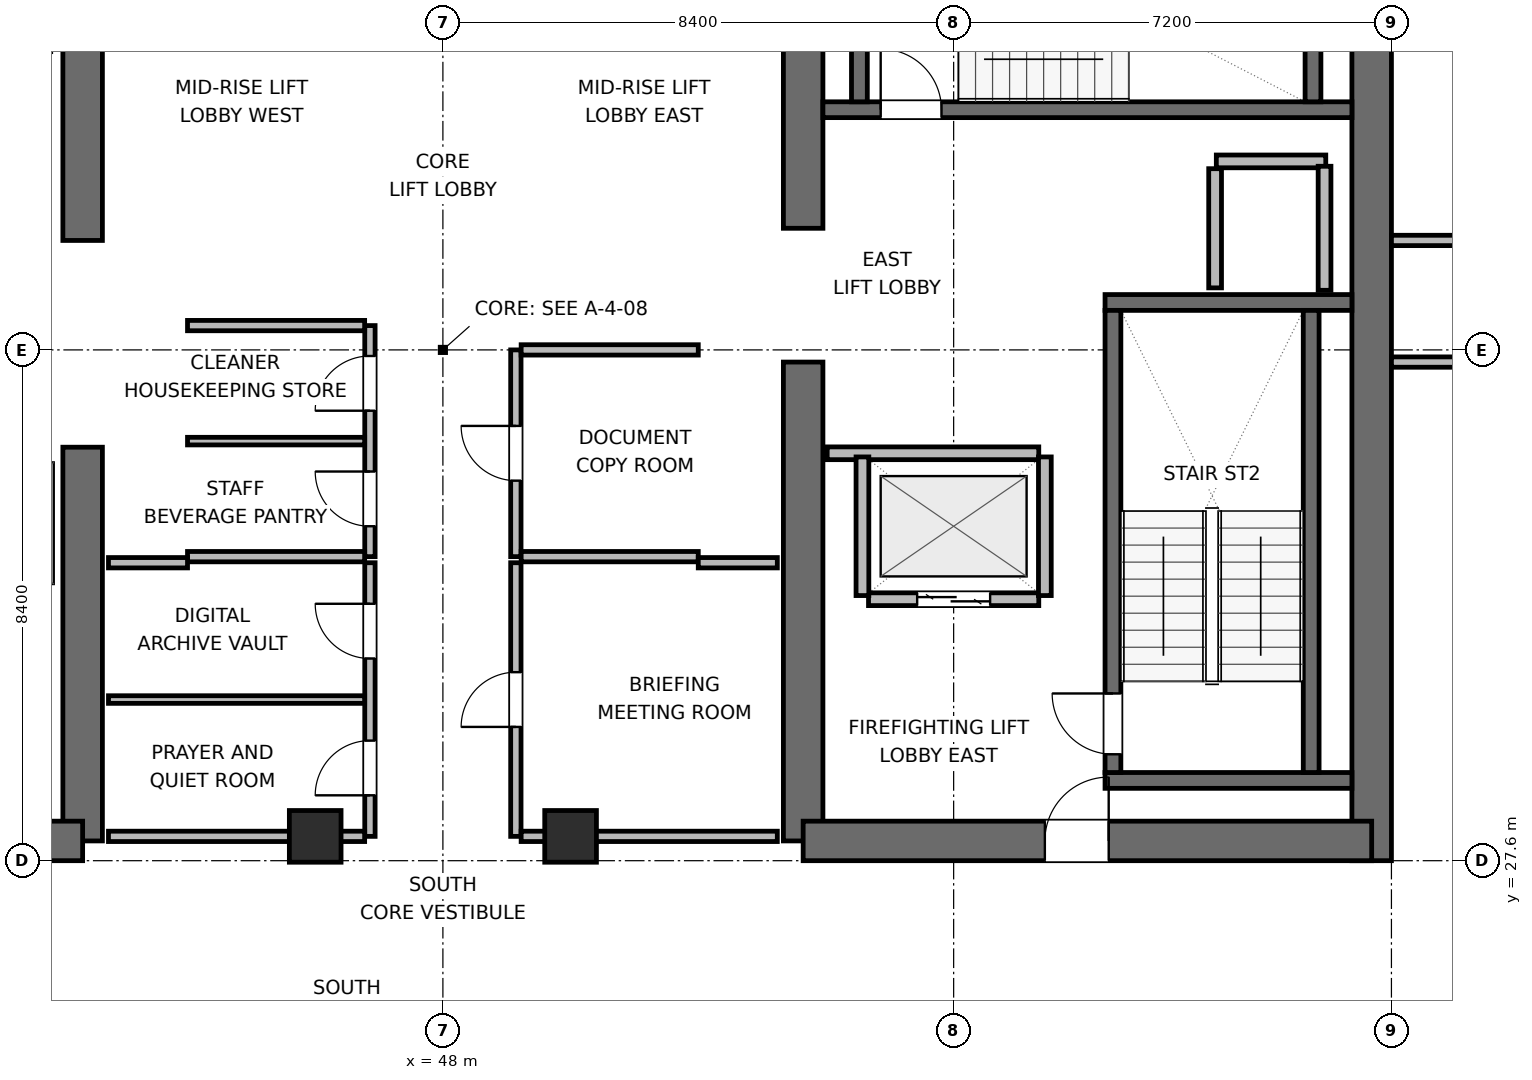
"""IFC4 building model, lengths in metres.
Left out: names, types, materials, properties, quantities, classifications, styles, units other than length and angle.
Written with IfcOpenShell. Run it as: python <this file> out.ifc"""

import sys

from ifc_helpers import new_model, si_unit, direction, frame, frame_2d, origin, origin_2d, place, context, subcontext, project, spatial, rectangle, extrude, element, fill, save


model = new_model("IFC4")
c1 = context("Model", 3, precision=1e-05, world=origin(), true_north=direction((0.0, 1.0)))
c2 = subcontext(c1, "Body", "Model", "MODEL_VIEW")
j1 = project(units=[si_unit("LENGTHUNIT", "METRE"), si_unit("PLANEANGLEUNIT", "RADIAN")], contexts=[c1])
p1 = place(None, origin())
s1 = spatial("IfcSite", under=j1, at=p1, CompositionType="ELEMENT")
p2 = place(p1, origin())
s2 = spatial("IfcBuilding", under=s1, at=p2, CompositionType="ELEMENT")
p3 = place(p2, frame((0.0, 0.0, 190.2)))
s3 = spatial("IfcBuildingStorey", under=s2, at=p3, CompositionType="ELEMENT", Elevation=190.2)
p4 = place(p3, frame((42.075, 27.925, 0.0), z_axis=(0.0, 0.0, 1.0), x_axis=(0.0, 1.0, 0.0)))
e1 = element("IfcWall", 1, at=p4, inside=s3, PredefinedType="SHEAR", context=c2, shape_type="SweptSolid", body=[
    extrude(rectangle(XDim=6.475, YDim=0.65, at=frame_2d((3.237, 0.0))), origin(), (0.0, 0.0, 1.0), 3.9),
])
p5 = place(p3, frame((42.075, 37.8, 0.0), z_axis=(0.0, 0.0, 1.0), x_axis=(0.0, 1.0, 0.0)))
e2 = element("IfcWall", 2, at=p5, inside=s3, PredefinedType="SHEAR", context=c2, shape_type="SweptSolid", body=[
    extrude(rectangle(XDim=6.275, YDim=0.65, at=frame_2d((3.137, 0.0))), origin(), (0.0, 0.0, 1.0), 3.9),
])
p6 = place(p3, frame((32.725, 27.925, 0.0), z_axis=(0.0, 0.0, 1.0), x_axis=(1.0, 0.0, 0.0)))
e3 = element("IfcWall", 3, at=p6, inside=s3, PredefinedType="SHEAR", context=c2, shape_type="SweptSolid", body=[
    extrude(rectangle(XDim=9.35, YDim=0.65, at=frame_2d((4.675, 0.0))), origin(), (0.0, 0.0, 1.0), 3.9),
])
p7 = place(p6, frame((5.025, 0.0, 0.0)))
e4 = element("IfcOpeningElement", 4, at=p7, cuts=e3, PredefinedType="OPENING", context=c2, shape_type="SweptSolid", body=[
    extrude(rectangle(XDim=1.05, YDim=2.04, at=frame_2d((0.525, 1.02))), frame((0.0, 0.335, 0.0), z_axis=(0.0, -1.0, 0.0), x_axis=(1.0, 0.0, 0.0)), (0.0, 0.0, 1.0), 0.67),
])
p8 = place(p3, frame((53.925, 27.925, 0.0), z_axis=(0.0, 0.0, 1.0), x_axis=(0.0, 1.0, 0.0)))
e5 = element("IfcWall", 5, at=p8, inside=s3, PredefinedType="SHEAR", context=c2, shape_type="SweptSolid", body=[
    extrude(rectangle(XDim=7.875, YDim=0.65, at=frame_2d((3.938, 0.0))), origin(), (0.0, 0.0, 1.0), 3.9),
])
p9 = place(p3, frame((53.925, 38.0, 0.0), z_axis=(0.0, 0.0, 1.0), x_axis=(0.0, 1.0, 0.0)))
e6 = element("IfcWall", 6, at=p9, inside=s3, PredefinedType="SHEAR", context=c2, shape_type="SweptSolid", body=[
    extrude(rectangle(XDim=6.075, YDim=0.65, at=frame_2d((3.038, 0.0))), origin(), (0.0, 0.0, 1.0), 3.9),
])
p10 = place(p3, frame((63.275, 27.6, 0.0), z_axis=(0.0, 0.0, 1.0), x_axis=(0.0, 1.0, 0.0)))
e7 = element("IfcWall", 7, at=p10, inside=s3, PredefinedType="SHEAR", context=c2, shape_type="SweptSolid", body=[
    extrude(rectangle(XDim=16.8, YDim=0.65, at=frame_2d((8.4, 0.0))), origin(), (0.0, 0.0, 1.0), 3.9),
])
p11 = place(p3, frame((53.925, 27.925, 0.0), z_axis=(0.0, 0.0, 1.0), x_axis=(1.0, 0.0, 0.0)))
e8 = element("IfcWall", 8, at=p11, inside=s3, PredefinedType="SHEAR", context=c2, shape_type="SweptSolid", body=[
    extrude(rectangle(XDim=9.35, YDim=0.65, at=frame_2d((4.675, 0.0))), origin(), (0.0, 0.0, 1.0), 3.9),
])
p12 = place(p11, frame((3.975, 0.0, 0.0)))
e9 = element("IfcOpeningElement", 9, at=p12, cuts=e8, PredefinedType="OPENING", context=c2, shape_type="SweptSolid", body=[
    extrude(rectangle(XDim=1.05, YDim=2.04, at=frame_2d((0.525, 1.02))), frame((0.0, 0.335, 0.0), z_axis=(0.0, -1.0, 0.0), x_axis=(1.0, 0.0, 0.0)), (0.0, 0.0, 1.0), 0.67),
])
for number, where, z_axis, x_axis in (
    (10, (58.89, 28.92, 0.0), (0.0, 0.0, 1.0), (1.0, 0.0, 0.0)),
    (11, (58.89, 36.78, 0.0), (0.0, 0.0, 1.0), (1.0, 0.0, 0.0)),
):
    element("IfcWall", number, at=place(p3, frame(where, z_axis=z_axis, x_axis=x_axis)), inside=s3, PredefinedType="SHEAR", context=c2, shape_type="SweptSolid", body=[
        extrude(rectangle(XDim=4.06, YDim=0.26, at=frame_2d((2.03, 0.0))), origin(), (0.0, 0.0, 1.0), 3.9),
    ])
p13 = place(p3, frame((59.02, 29.05, 0.0), z_axis=(0.0, 0.0, 1.0), x_axis=(0.0, 1.0, 0.0)))
e12 = element("IfcWall", 12, at=p13, inside=s3, PredefinedType="SHEAR", context=c2, shape_type="SweptSolid", body=[
    extrude(rectangle(XDim=7.6, YDim=0.26, at=frame_2d((3.8, 0.0))), origin(), (0.0, 0.0, 1.0), 3.9),
])
p14 = place(p13, frame((0.3, 0.0, 0.0)))
e13 = element("IfcOpeningElement", 13, at=p14, cuts=e12, PredefinedType="OPENING", context=c2, shape_type="SweptSolid", body=[
    extrude(rectangle(XDim=1.0, YDim=2.04, at=frame_2d((0.5, 1.02))), frame((0.0, 0.14, 0.0), z_axis=(0.0, -1.0, 0.0), x_axis=(1.0, 0.0, 0.0)), (0.0, 0.0, 1.0), 0.28),
])
p15 = place(p3, frame((62.28, 29.05, 0.0), z_axis=(0.0, 0.0, 1.0), x_axis=(0.0, 1.0, 0.0)))
e14 = element("IfcWall", 14, at=p15, inside=s3, PredefinedType="SHEAR", context=c2, shape_type="SweptSolid", body=[
    extrude(rectangle(XDim=7.6, YDim=0.26, at=frame_2d((3.8, 0.0))), origin(), (0.0, 0.0, 1.0), 3.9),
])
p16 = place(p3, frame((54.25, 39.95, 0.0), z_axis=(0.0, 0.0, 1.0), x_axis=(1.0, 0.0, 0.0)))
e15 = element("IfcWall", 15, at=p16, inside=s3, PredefinedType="SHEAR", context=c2, shape_type="SweptSolid", body=[
    extrude(rectangle(XDim=8.7, YDim=0.26, at=frame_2d((4.35, 0.0))), origin(), (0.0, 0.0, 1.0), 3.9),
])
p17 = place(p16, frame((0.95, 0.0, 0.0)))
e16 = element("IfcOpeningElement", 16, at=p17, cuts=e15, PredefinedType="OPENING", context=c2, shape_type="SweptSolid", body=[
    extrude(rectangle(XDim=1.0, YDim=2.04, at=frame_2d((0.5, 1.02))), frame((0.0, 0.14, 0.0), z_axis=(0.0, -1.0, 0.0), x_axis=(1.0, 0.0, 0.0)), (0.0, 0.0, 1.0), 0.28),
])
for number, where, z_axis, x_axis in (
    (17, (54.85, 40.08, 0.0), (0.0, 0.0, 1.0), (0.0, 1.0, 0.0)),
    (18, (62.31, 40.08, 0.0), (0.0, 0.0, 1.0), (0.0, 1.0, 0.0)),
):
    element("IfcWall", number, at=place(p3, frame(where, z_axis=z_axis, x_axis=x_axis)), inside=s3, PredefinedType="SHEAR", context=c2, shape_type="SweptSolid", body=[
        extrude(rectangle(XDim=2.94, YDim=0.26, at=frame_2d((1.47, 0.0))), origin(), (0.0, 0.0, 1.0), 3.9),
    ])
for number, where, z_axis, x_axis in (
    (19, (45.9, 28.0, 0.0), (0.0, 0.0, 1.0), (1.0, 0.0, 0.0)),
    (20, (50.1, 28.0, 0.0), (0.0, 0.0, 1.0), (1.0, 0.0, 0.0)),
):
    element("IfcColumn", number, at=place(p3, frame(where, z_axis=z_axis, x_axis=x_axis)), inside=s3, PredefinedType="COLUMN", context=c2, shape_type="SweptSolid", body=[
        extrude(rectangle(XDim=0.85, YDim=0.85, at=origin_2d()), origin(), (0.0, 0.0, 1.0), 3.9),
    ])
p18 = place(p3, frame((60.72, 39.1, 0.0), z_axis=(0.0, 0.0, 1.0), x_axis=(1.0, 0.0, 0.0)))
e21 = element("IfcWall", 21, at=p18, inside=s3, PredefinedType="PARTITIONING", context=c2, shape_type="SweptSolid", body=[
    extrude(rectangle(XDim=1.8, YDim=0.21, at=frame_2d((0.9, 0.0))), origin(), (0.0, 0.0, 1.0), 3.68),
])
p19 = place(p3, frame((60.7, 37.02, 0.0), z_axis=(0.0, 0.0, 1.0), x_axis=(0.0, 1.0, 0.0)))
e22 = element("IfcWall", 22, at=p19, inside=s3, PredefinedType="PARTITIONING", context=c2, shape_type="SweptSolid", body=[
    extrude(rectangle(XDim=1.96, YDim=0.21, at=frame_2d((0.98, 0.0))), origin(), (0.0, 0.0, 1.0), 3.68),
])
p20 = place(p3, frame((62.5, 36.98, 0.0), z_axis=(0.0, 0.0, 1.0), x_axis=(0.0, 1.0, 0.0)))
e23 = element("IfcWall", 23, at=p20, inside=s3, PredefinedType="PARTITIONING", context=c2, shape_type="SweptSolid", body=[
    extrude(rectangle(XDim=2.04, YDim=0.21, at=frame_2d((1.02, 0.0))), origin(), (0.0, 0.0, 1.0), 3.68),
])
p21 = place(p3, frame((55.0, 31.9, 0.0), z_axis=(0.0, 0.0, 1.0), x_axis=(1.0, 0.0, 0.0)))
e24 = element("IfcWall", 24, at=p21, inside=s3, PredefinedType="PARTITIONING", context=c2, shape_type="SweptSolid", body=[
    extrude(rectangle(XDim=2.8, YDim=0.21, at=frame_2d((1.4, 0.0))), origin(), (0.0, 0.0, 1.0), 3.68),
])
p22 = place(p21, frame((0.8, 0.0, 0.0)))
e25 = element("IfcOpeningElement", 25, at=p22, cuts=e24, PredefinedType="OPENING", context=c2, shape_type="SweptSolid", body=[
    extrude(rectangle(XDim=1.2, YDim=2.04, at=frame_2d((0.6, 1.02))), frame((0.0, 0.115, 0.0), z_axis=(0.0, -1.0, 0.0), x_axis=(1.0, 0.0, 0.0)), (0.0, 0.0, 1.0), 0.23),
])
p23 = place(p3, frame((54.32, 34.3, 0.0), z_axis=(0.0, 0.0, 1.0), x_axis=(1.0, 0.0, 0.0)))
e26 = element("IfcWall", 26, at=p23, inside=s3, PredefinedType="PARTITIONING", context=c2, shape_type="SweptSolid", body=[
    extrude(rectangle(XDim=3.48, YDim=0.21, at=frame_2d((1.74, 0.0))), origin(), (0.0, 0.0, 1.0), 3.68),
])
for number, where, z_axis, x_axis in (
    (27, (54.9, 31.96, 0.0), (0.0, 0.0, 1.0), (0.0, 1.0, 0.0)),
    (28, (57.9, 31.96, 0.0), (0.0, 0.0, 1.0), (0.0, 1.0, 0.0)),
):
    element("IfcWall", number, at=place(p3, frame(where, z_axis=z_axis, x_axis=x_axis)), inside=s3, PredefinedType="PARTITIONING", context=c2, shape_type="SweptSolid", body=[
        extrude(rectangle(XDim=2.28, YDim=0.21, at=frame_2d((1.14, 0.0))), origin(), (0.0, 0.0, 1.0), 3.68),
    ])
p24 = place(p3, frame((46.8, 32.6, 0.0), z_axis=(0.0, 0.0, 1.0), x_axis=(0.0, 1.0, 0.0)))
e29 = element("IfcWall", 29, at=p24, inside=s3, PredefinedType="PARTITIONING", context=c2, shape_type="SweptSolid", body=[
    extrude(rectangle(XDim=3.8, YDim=0.17, at=frame_2d((1.9, 0.0))), origin(), (0.0, 0.0, 1.0), 3.68),
])
p25 = place(p24, frame((0.5, 0.0, 0.0)))
e30 = element("IfcOpeningElement", 30, at=p25, cuts=e29, PredefinedType="OPENING", context=c2, shape_type="SweptSolid", body=[
    extrude(rectangle(XDim=0.9, YDim=2.02, at=frame_2d((0.45, 1.01))), frame((0.0, 0.095, 0.0), z_axis=(0.0, -1.0, 0.0), x_axis=(1.0, 0.0, 0.0)), (0.0, 0.0, 1.0), 0.19),
])
p26 = place(p24, frame((2.4, 0.0, 0.0)))
e31 = element("IfcOpeningElement", 31, at=p26, cuts=e29, PredefinedType="OPENING", context=c2, shape_type="SweptSolid", body=[
    extrude(rectangle(XDim=0.9, YDim=2.02, at=frame_2d((0.45, 1.01))), frame((0.0, 0.095, 0.0), z_axis=(0.0, -1.0, 0.0), x_axis=(1.0, 0.0, 0.0)), (0.0, 0.0, 1.0), 0.19),
])
for number, where, z_axis, x_axis in (
    (32, (43.8, 32.6, 0.0), (0.0, 0.0, 1.0), (1.0, 0.0, 0.0)),
    (33, (43.8, 36.4, 0.0), (0.0, 0.0, 1.0), (1.0, 0.0, 0.0)),
):
    element("IfcWall", number, at=place(p3, frame(where, z_axis=z_axis, x_axis=x_axis)), inside=s3, PredefinedType="PARTITIONING", context=c2, shape_type="SweptSolid", body=[
        extrude(rectangle(XDim=2.913, YDim=0.17, at=frame_2d((1.457, 0.0))), origin(), (0.0, 0.0, 1.0), 3.68),
    ])
p27 = place(p3, frame((43.8, 34.5, 0.0), z_axis=(0.0, 0.0, 1.0), x_axis=(1.0, 0.0, 0.0)))
e34 = element("IfcWall", 34, at=p27, inside=s3, PredefinedType="PARTITIONING", context=c2, shape_type="SweptSolid", body=[
    extrude(rectangle(XDim=2.913, YDim=0.125, at=frame_2d((1.457, 0.0))), origin(), (0.0, 0.0, 1.0), 3.68),
])
p28 = place(p3, frame((49.2, 32.6, 0.0), z_axis=(0.0, 0.0, 1.0), x_axis=(0.0, 1.0, 0.0)))
e35 = element("IfcWall", 35, at=p28, inside=s3, PredefinedType="PARTITIONING", context=c2, shape_type="SweptSolid", body=[
    extrude(rectangle(XDim=3.4, YDim=0.17, at=frame_2d((1.7, 0.0))), origin(), (0.0, 0.0, 1.0), 3.68),
])
p29 = place(p28, frame((1.25, 0.0, 0.0)))
e36 = element("IfcOpeningElement", 36, at=p29, cuts=e35, PredefinedType="OPENING", context=c2, shape_type="SweptSolid", body=[
    extrude(rectangle(XDim=0.9, YDim=2.02, at=frame_2d((0.45, 1.01))), frame((0.0, 0.095, 0.0), z_axis=(0.0, -1.0, 0.0), x_axis=(1.0, 0.0, 0.0)), (0.0, 0.0, 1.0), 0.19),
])
for number, where, z_axis, x_axis in (
    (37, (49.287, 32.6, 0.0), (0.0, 0.0, 1.0), (1.0, 0.0, 0.0)),
    (38, (49.287, 36.0, 0.0), (0.0, 0.0, 1.0), (1.0, 0.0, 0.0)),
):
    element("IfcWall", number, at=place(p3, frame(where, z_axis=z_axis, x_axis=x_axis)), inside=s3, PredefinedType="PARTITIONING", context=c2, shape_type="SweptSolid", body=[
        extrude(rectangle(XDim=2.913, YDim=0.17, at=frame_2d((1.457, 0.0))), origin(), (0.0, 0.0, 1.0), 3.68),
    ])
p30 = place(p3, frame((46.8, 28.0, 0.0), z_axis=(0.0, 0.0, 1.0), x_axis=(0.0, 1.0, 0.0)))
e39 = element("IfcWall", 39, at=p30, inside=s3, PredefinedType="PARTITIONING", context=c2, shape_type="SweptSolid", body=[
    extrude(rectangle(XDim=4.5, YDim=0.17, at=frame_2d((2.25, 0.0))), origin(), (0.0, 0.0, 1.0), 3.68),
])
p31 = place(p30, frame((0.675, 0.0, 0.0)))
e40 = element("IfcOpeningElement", 40, at=p31, cuts=e39, PredefinedType="OPENING", context=c2, shape_type="SweptSolid", body=[
    extrude(rectangle(XDim=0.9, YDim=2.02, at=frame_2d((0.45, 1.01))), frame((0.0, 0.095, 0.0), z_axis=(0.0, -1.0, 0.0), x_axis=(1.0, 0.0, 0.0)), (0.0, 0.0, 1.0), 0.19),
])
p32 = place(p30, frame((2.925, 0.0, 0.0)))
e41 = element("IfcOpeningElement", 41, at=p32, cuts=e39, PredefinedType="OPENING", context=c2, shape_type="SweptSolid", body=[
    extrude(rectangle(XDim=0.9, YDim=2.02, at=frame_2d((0.45, 1.01))), frame((0.0, 0.095, 0.0), z_axis=(0.0, -1.0, 0.0), x_axis=(1.0, 0.0, 0.0)), (0.0, 0.0, 1.0), 0.19),
])
p33 = place(p3, frame((42.5, 28.0, 0.0), z_axis=(0.0, 0.0, 1.0), x_axis=(1.0, 0.0, 0.0)))
e42 = element("IfcWall", 42, at=p33, inside=s3, PredefinedType="PARTITIONING", context=c2, shape_type="SweptSolid", body=[
    extrude(rectangle(XDim=4.213, YDim=0.17, at=frame_2d((2.106, 0.0))), origin(), (0.0, 0.0, 1.0), 2.765),
])
p34 = place(p3, frame((42.5, 32.5, 0.0), z_axis=(0.0, 0.0, 1.0), x_axis=(1.0, 0.0, 0.0)))
e43 = element("IfcWall", 43, at=p34, inside=s3, PredefinedType="PARTITIONING", context=c2, shape_type="SweptSolid", body=[
    extrude(rectangle(XDim=1.3, YDim=0.17, at=frame_2d((0.65, 0.0))), origin(), (0.0, 0.0, 1.0), 3.68),
])
p35 = place(p3, frame((42.5, 30.25, 0.0), z_axis=(0.0, 0.0, 1.0), x_axis=(1.0, 0.0, 0.0)))
e44 = element("IfcWall", 44, at=p35, inside=s3, PredefinedType="PARTITIONING", context=c2, shape_type="SweptSolid", body=[
    extrude(rectangle(XDim=4.213, YDim=0.125, at=frame_2d((2.106, 0.0))), origin(), (0.0, 0.0, 1.0), 3.68),
])
p36 = place(p3, frame((49.2, 28.0, 0.0), z_axis=(0.0, 0.0, 1.0), x_axis=(0.0, 1.0, 0.0)))
e45 = element("IfcWall", 45, at=p36, inside=s3, PredefinedType="PARTITIONING", context=c2, shape_type="SweptSolid", body=[
    extrude(rectangle(XDim=4.5, YDim=0.17, at=frame_2d((2.25, 0.0))), origin(), (0.0, 0.0, 1.0), 3.68),
])
p37 = place(p36, frame((1.8, 0.0, 0.0)))
e46 = element("IfcOpeningElement", 46, at=p37, cuts=e45, PredefinedType="OPENING", context=c2, shape_type="SweptSolid", body=[
    extrude(rectangle(XDim=0.9, YDim=2.02, at=frame_2d((0.45, 1.01))), frame((0.0, 0.095, 0.0), z_axis=(0.0, -1.0, 0.0), x_axis=(1.0, 0.0, 0.0)), (0.0, 0.0, 1.0), 0.19),
])
p38 = place(p3, frame((49.287, 28.0, 0.0), z_axis=(0.0, 0.0, 1.0), x_axis=(1.0, 0.0, 0.0)))
e47 = element("IfcWall", 47, at=p38, inside=s3, PredefinedType="PARTITIONING", context=c2, shape_type="SweptSolid", body=[
    extrude(rectangle(XDim=4.213, YDim=0.17, at=frame_2d((2.106, 0.0))), origin(), (0.0, 0.0, 1.0), 2.765),
])
p39 = place(p3, frame((52.2, 32.5, 0.0), z_axis=(0.0, 0.0, 1.0), x_axis=(1.0, 0.0, 0.0)))
e48 = element("IfcWall", 48, at=p39, inside=s3, PredefinedType="PARTITIONING", context=c2, shape_type="SweptSolid", body=[
    extrude(rectangle(XDim=1.3, YDim=0.17, at=frame_2d((0.65, 0.0))), origin(), (0.0, 0.0, 1.0), 3.68),
])
p40 = place(p3, frame((63.6, 35.8, 0.0), z_axis=(0.0, 0.0, 1.0), x_axis=(1.0, 0.0, 0.0)))
e49 = element("IfcWall", 49, at=p40, inside=s3, PredefinedType="PARTITIONING", context=c2, shape_type="SweptSolid", body=[
    extrude(rectangle(XDim=6.975, YDim=0.17, at=frame_2d((3.487, 0.0))), origin(), (0.0, 0.0, 1.0), 3.043),
])
p41 = place(p40, frame((1.1, 0.0, 0.0)))
e50 = element("IfcOpeningElement", 50, at=p41, cuts=e49, PredefinedType="OPENING", context=c2, shape_type="SweptSolid", body=[
    extrude(rectangle(XDim=0.95, YDim=2.04, at=frame_2d((0.475, 1.02))), frame((0.0, 0.095, 0.0), z_axis=(0.0, -1.0, 0.0), x_axis=(1.0, 0.0, 0.0)), (0.0, 0.0, 1.0), 0.19),
])
p42 = place(p3, frame((63.6, 37.8, 0.0), z_axis=(0.0, 0.0, 1.0), x_axis=(1.0, 0.0, 0.0)))
e51 = element("IfcWall", 51, at=p42, inside=s3, PredefinedType="PARTITIONING", context=c2, shape_type="SweptSolid", body=[
    extrude(rectangle(XDim=4.96, YDim=0.17, at=frame_2d((2.48, 0.0))), origin(), (0.0, 0.0, 1.0), 3.68),
])
p43 = place(p42, frame((1.1, 0.0, 0.0)))
e52 = element("IfcOpeningElement", 52, at=p43, cuts=e51, PredefinedType="OPENING", context=c2, shape_type="SweptSolid", body=[
    extrude(rectangle(XDim=0.95, YDim=2.04, at=frame_2d((0.475, 1.02))), frame((0.0, 0.095, 0.0), z_axis=(0.0, -1.0, 0.0), x_axis=(1.0, 0.0, 0.0)), (0.0, 0.0, 1.0), 0.19),
])
p44 = place(p14, origin())
e53 = element("IfcDoor", 53, at=p44, inside=s3, OperationType="SINGLE_SWING_RIGHT", PredefinedType="DOOR", context=c2, shape_type="SweptSolid", body=[
    extrude(rectangle(XDim=1.0, YDim=2.04, at=frame_2d((0.5, 1.02))), frame((0.0, 0.025, 0.0), z_axis=(0.0, -1.0, 0.0), x_axis=(1.0, 0.0, 0.0)), (0.0, 0.0, 1.0), 0.05),
])
fill(e13, e53)
p45 = place(p17, origin())
e54 = element("IfcDoor", 54, at=p45, inside=s3, OperationType="SINGLE_SWING_LEFT", PredefinedType="DOOR", context=c2, shape_type="SweptSolid", body=[
    extrude(rectangle(XDim=1.0, YDim=2.04, at=frame_2d((0.5, 1.02))), frame((0.0, 0.025, 0.0), z_axis=(0.0, -1.0, 0.0), x_axis=(1.0, 0.0, 0.0)), (0.0, 0.0, 1.0), 0.05),
])
fill(e16, e54)
p46 = place(p22, origin())
e55 = element("IfcDoor", 55, at=p46, inside=s3, OperationType="DOUBLE_DOOR_SLIDING", PredefinedType="DOOR", context=c2, shape_type="SweptSolid", body=[
    extrude(rectangle(XDim=1.2, YDim=2.04, at=frame_2d((0.6, 1.02))), frame((0.0, 0.025, 0.0), z_axis=(0.0, -1.0, 0.0), x_axis=(1.0, 0.0, 0.0)), (0.0, 0.0, 1.0), 0.05),
])
fill(e25, e55)
p47 = place(p12, origin())
e56 = element("IfcDoor", 56, at=p47, inside=s3, OperationType="SINGLE_SWING_RIGHT", PredefinedType="DOOR", context=c2, shape_type="SweptSolid", body=[
    extrude(rectangle(XDim=1.05, YDim=2.04, at=frame_2d((0.525, 1.02))), frame((0.0, 0.025, 0.0), z_axis=(0.0, -1.0, 0.0), x_axis=(1.0, 0.0, 0.0)), (0.0, 0.0, 1.0), 0.05),
])
fill(e9, e56)
p48 = place(p25, origin())
e57 = element("IfcDoor", 57, at=p48, inside=s3, OperationType="SINGLE_SWING_RIGHT", PredefinedType="DOOR", context=c2, shape_type="SweptSolid", body=[
    extrude(rectangle(XDim=0.9, YDim=2.02, at=frame_2d((0.45, 1.01))), frame((0.0, 0.025, 0.0), z_axis=(0.0, -1.0, 0.0), x_axis=(1.0, 0.0, 0.0)), (0.0, 0.0, 1.0), 0.05),
])
fill(e30, e57)
p49 = place(p26, origin())
e58 = element("IfcDoor", 58, at=p49, inside=s3, OperationType="SINGLE_SWING_LEFT", PredefinedType="DOOR", context=c2, shape_type="SweptSolid", body=[
    extrude(rectangle(XDim=0.9, YDim=2.02, at=frame_2d((0.45, 1.01))), frame((0.0, 0.025, 0.0), z_axis=(0.0, -1.0, 0.0), x_axis=(1.0, 0.0, 0.0)), (0.0, 0.0, 1.0), 0.05),
])
fill(e31, e58)
p50 = place(p29, origin())
e59 = element("IfcDoor", 59, at=p50, inside=s3, OperationType="SINGLE_SWING_RIGHT", PredefinedType="DOOR", context=c2, shape_type="SweptSolid", body=[
    extrude(rectangle(XDim=0.9, YDim=2.02, at=frame_2d((0.45, 1.01))), frame((0.0, 0.025, 0.0), z_axis=(0.0, -1.0, 0.0), x_axis=(1.0, 0.0, 0.0)), (0.0, 0.0, 1.0), 0.05),
])
fill(e36, e59)
p51 = place(p31, origin())
e60 = element("IfcDoor", 60, at=p51, inside=s3, OperationType="SINGLE_SWING_LEFT", PredefinedType="DOOR", context=c2, shape_type="SweptSolid", body=[
    extrude(rectangle(XDim=0.9, YDim=2.02, at=frame_2d((0.45, 1.01))), frame((0.0, 0.025, 0.0), z_axis=(0.0, -1.0, 0.0), x_axis=(1.0, 0.0, 0.0)), (0.0, 0.0, 1.0), 0.05),
])
fill(e40, e60)
p52 = place(p32, origin())
e61 = element("IfcDoor", 61, at=p52, inside=s3, OperationType="SINGLE_SWING_RIGHT", PredefinedType="DOOR", context=c2, shape_type="SweptSolid", body=[
    extrude(rectangle(XDim=0.9, YDim=2.02, at=frame_2d((0.45, 1.01))), frame((0.0, 0.025, 0.0), z_axis=(0.0, -1.0, 0.0), x_axis=(1.0, 0.0, 0.0)), (0.0, 0.0, 1.0), 0.05),
])
fill(e41, e61)
p53 = place(p37, origin())
e62 = element("IfcDoor", 62, at=p53, inside=s3, OperationType="SINGLE_SWING_LEFT", PredefinedType="DOOR", context=c2, shape_type="SweptSolid", body=[
    extrude(rectangle(XDim=0.9, YDim=2.02, at=frame_2d((0.45, 1.01))), frame((0.0, 0.025, 0.0), z_axis=(0.0, -1.0, 0.0), x_axis=(1.0, 0.0, 0.0)), (0.0, 0.0, 1.0), 0.05),
])
fill(e46, e62)
save(model, sys.argv[1])
